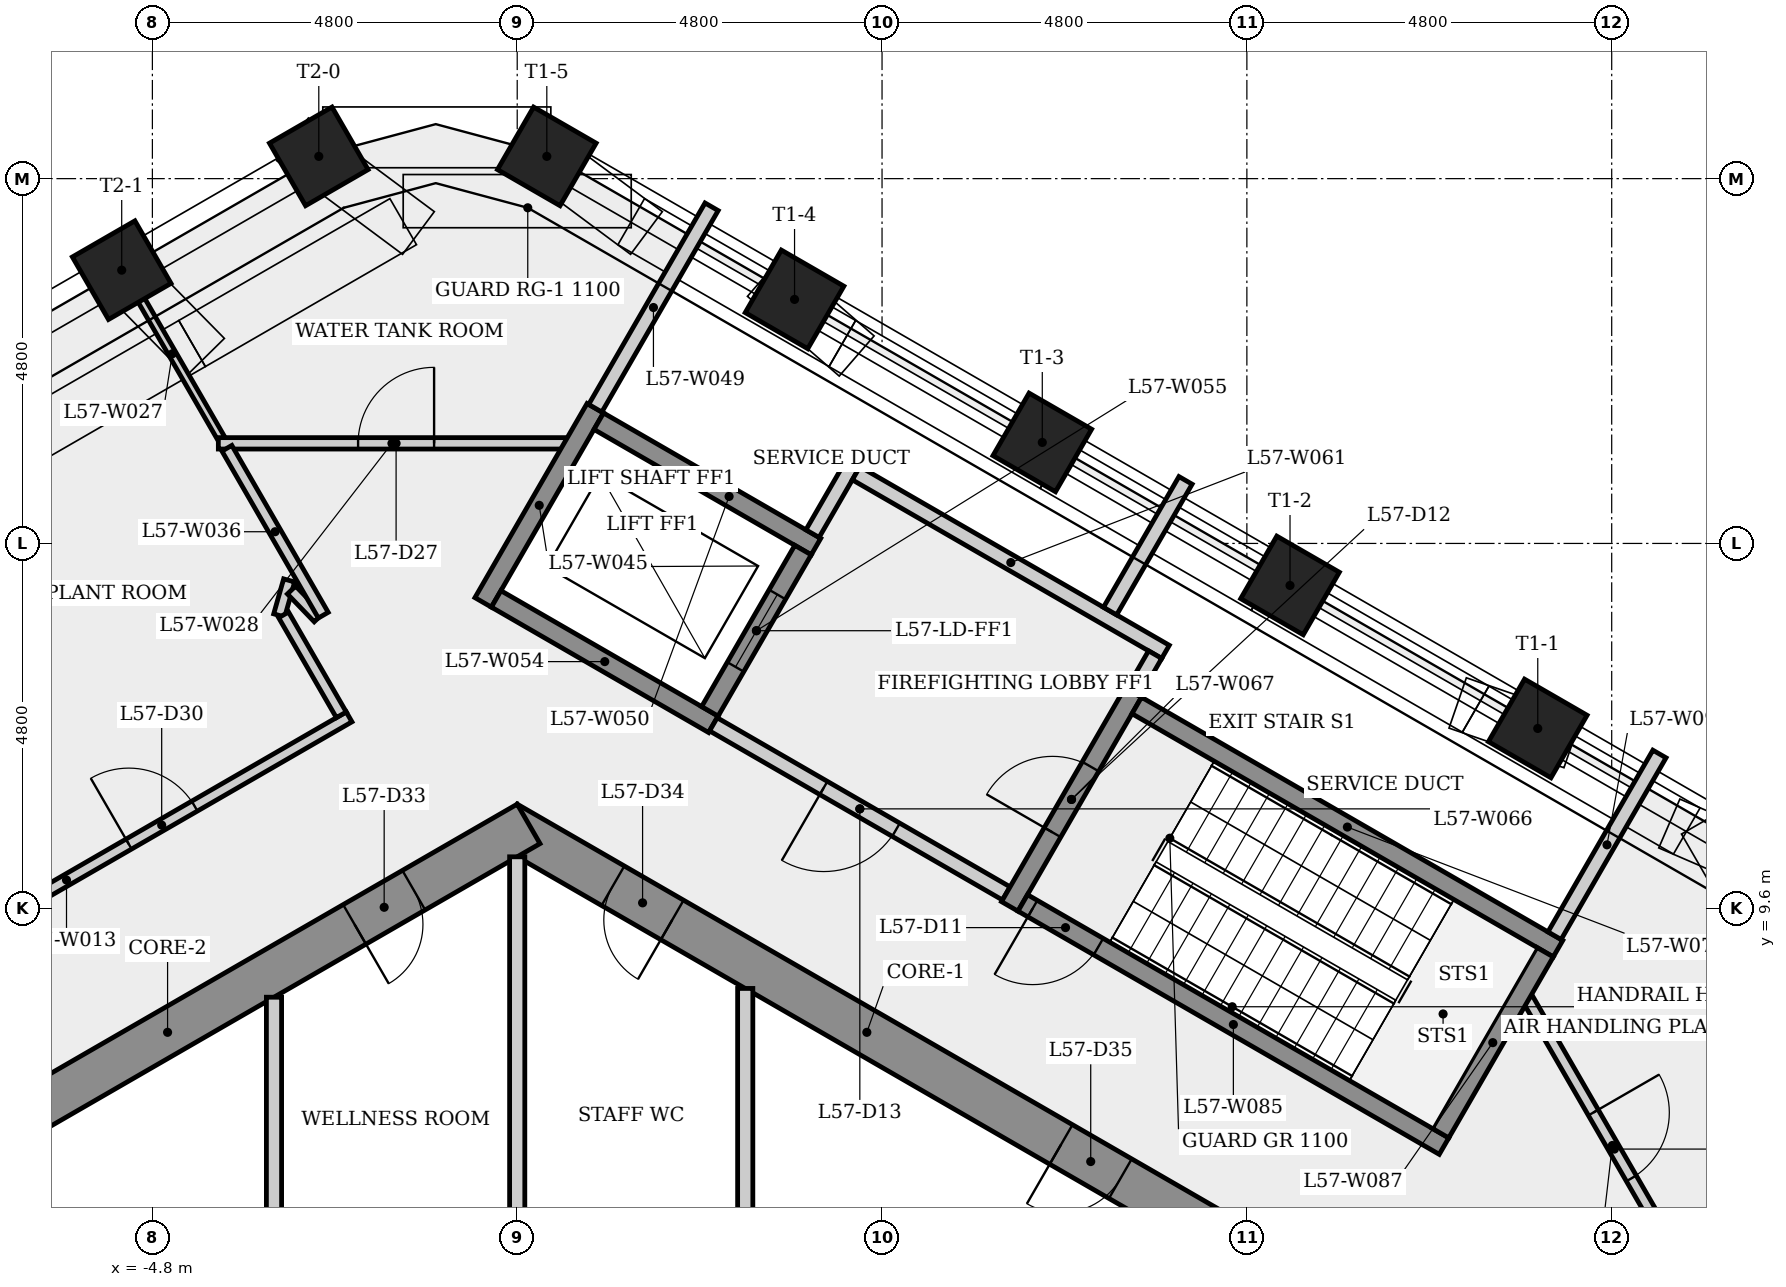
"""IFC4 building model, lengths in metres.
Left out: names, types, materials, properties, quantities, classifications, styles, units other than length and angle.
Written with IfcOpenShell. Run it as: python <this file> out.ifc"""

import sys

from ifc_helpers import new_model, si_unit, direction, frame, frame_2d, origin, origin_2d, place, context, subcontext, project, spatial, rectangle, extrude, element, fill, save


model = new_model("IFC4")
c1 = context("Model", 3, precision=1e-05, world=origin(), true_north=direction((0.0, 1.0)))
c2 = subcontext(c1, "Body", "Model", "MODEL_VIEW")
j1 = project(units=[si_unit("LENGTHUNIT", "METRE"), si_unit("PLANEANGLEUNIT", "RADIAN")], contexts=[c1])
p1 = place(None, origin())
s1 = spatial("IfcSite", under=j1, at=p1, CompositionType="ELEMENT")
p2 = place(p1, origin())
s2 = spatial("IfcBuilding", under=s1, at=p2, CompositionType="ELEMENT")
p3 = place(p2, frame((0.0, 0.0, 214.1)))
s3 = spatial("IfcBuildingStorey", under=s2, at=p3, CompositionType="ELEMENT", Elevation=214.1)
p4 = place(p3, frame((9.35, 5.225, 0.0), z_axis=(0.0, 0.0, 1.0), x_axis=(-0.866023993627, 0.500002442456, 0.0)))
e1 = element("IfcWall", 1, at=p4, inside=s3, PredefinedType="SHEAR", context=c2, shape_type="SweptSolid", body=[
    extrude(rectangle(XDim=10.97, YDim=0.6, at=frame_2d((5.485, 0.0))), origin(), (0.0, 0.0, 1.0), 4.8),
])
p5 = place(p4, frame((8.442, 0.0, 0.0)))
e2 = element("IfcOpeningElement", 2, at=p5, cuts=e1, PredefinedType="OPENING", context=c2, shape_type="SweptSolid", body=[
    extrude(rectangle(XDim=0.9, YDim=2.1, at=frame_2d((0.45, 1.05))), frame((0.0, 0.31, 0.0), z_axis=(0.0, -1.0, 0.0), x_axis=(1.0, 0.0, 0.0)), (0.0, 0.0, 1.0), 0.62),
])
p6 = place(p4, frame((1.634, 0.0, 0.0)))
e3 = element("IfcOpeningElement", 3, at=p6, cuts=e1, PredefinedType="OPENING", context=c2, shape_type="SweptSolid", body=[
    extrude(rectangle(XDim=0.9, YDim=2.1, at=frame_2d((0.45, 1.05))), frame((0.0, 0.31, 0.0), z_axis=(0.0, -1.0, 0.0), x_axis=(1.0, 0.0, 0.0)), (0.0, 0.0, 1.0), 0.62),
])
p7 = place(p3, frame((0.15, 10.71, 0.0), z_axis=(0.0, 0.0, 1.0), x_axis=(-0.866023993627, -0.500002442456, 0.0)))
e4 = element("IfcWall", 4, at=p7, inside=s3, PredefinedType="SHEAR", context=c2, shape_type="SweptSolid", body=[
    extrude(rectangle(XDim=10.97, YDim=0.6, at=frame_2d((5.485, 0.0))), origin(), (0.0, 0.0, 1.0), 4.8),
])
p8 = place(p7, frame((9.201, 0.0, 0.0)))
e5 = element("IfcOpeningElement", 5, at=p8, cuts=e4, PredefinedType="OPENING", context=c2, shape_type="SweptSolid", body=[
    extrude(rectangle(XDim=0.9, YDim=2.1, at=frame_2d((0.45, 1.05))), frame((0.0, 0.31, 0.0), z_axis=(0.0, -1.0, 0.0), x_axis=(1.0, 0.0, 0.0)), (0.0, 0.0, 1.0), 0.62),
])
p9 = place(p7, frame((1.744, 0.0, 0.0)))
e6 = element("IfcOpeningElement", 6, at=p9, cuts=e4, PredefinedType="OPENING", context=c2, shape_type="SweptSolid", body=[
    extrude(rectangle(XDim=0.9, YDim=2.1, at=frame_2d((0.45, 1.05))), frame((0.0, 0.31, 0.0), z_axis=(0.0, -1.0, 0.0), x_axis=(1.0, 0.0, 0.0)), (0.0, 0.0, 1.0), 0.62),
])
for number, where, z_axis, x_axis in (
    (7, (13.427, 11.966, 0.0), (0.0, 0.0, 1.0), (0.5, 0.866, 0.0)),
    (8, (10.168, 13.847, 0.0), (0.0, 0.0, 1.0), (0.5, 0.866, 0.0)),
    (9, (6.908, 15.729, 0.0), (0.0, 0.0, 1.0), (0.5, 0.866, 0.0)),
    (10, (3.649, 17.611, 0.0), (0.0, 0.0, 1.0), (0.5, 0.866, 0.0)),
    (11, (0.389, 19.493, 0.0), (0.0, 0.0, 1.0), (0.5, 0.866, 0.0)),
    (12, (-2.611, 19.493, 0.0), (0.0, 0.0, 1.0), (-0.5, 0.866, 0.0)),
    (13, (-5.204, 17.996, 0.0), (0.0, 0.0, 1.0), (-0.5, 0.866, 0.0)),
):
    element("IfcColumn", number, at=place(p3, frame(where, z_axis=z_axis, x_axis=x_axis)), inside=s3, PredefinedType="COLUMN", context=c2, shape_type="SweptSolid", body=[
        extrude(rectangle(XDim=0.95, YDim=0.95, at=origin_2d()), origin(), (0.0, 0.0, 1.0), 4.45),
    ])
p10 = place(p3, frame((-9.648, 7.824, 0.0), z_axis=(0.0, 0.0, 1.0), x_axis=(0.866024597333, 0.500001396812, 0.0)))
e14 = element("IfcWall", 14, at=p10, inside=s3, PredefinedType="PARTITIONING", context=c2, shape_type="SweptSolid", body=[
    extrude(rectangle(XDim=8.586, YDim=0.15, at=frame_2d((4.293, 0.0))), origin(), (0.0, 0.0, 1.0), 4.45),
])
p11 = place(p10, frame((5.239, 0.0, 0.0)))
e15 = element("IfcOpeningElement", 15, at=p11, cuts=e14, PredefinedType="OPENING", context=c2, shape_type="SweptSolid", body=[
    extrude(rectangle(XDim=1.0, YDim=2.1, at=frame_2d((0.5, 1.05))), frame((0.0, 0.085, 0.0), z_axis=(0.0, -1.0, 0.0), x_axis=(1.0, 0.0, 0.0)), (0.0, 0.0, 1.0), 0.17),
])
p12 = place(p3, frame((-3.895, 15.782, 0.0), z_axis=(0.0, 0.0, 1.0), x_axis=(-0.50002925274, 0.866008514048, 0.0)))
e16 = element("IfcWall", 16, at=p12, inside=s3, PredefinedType="PARTITIONING", context=c2, shape_type="SweptSolid", body=[
    extrude(rectangle(XDim=2.572, YDim=0.1, at=frame_2d((1.286, 0.0))), origin(), (0.0, 0.0, 1.0), 2.825),
])
p13 = place(p3, frame((-3.932, 15.717, 0.0), z_axis=(0.0, 0.0, 1.0), x_axis=(1.0, 0.0, 0.0)))
e17 = element("IfcWall", 17, at=p13, inside=s3, PredefinedType="PARTITIONING", context=c2, shape_type="SweptSolid", body=[
    extrude(rectangle(XDim=4.568, YDim=0.15, at=frame_2d((2.284, 0.0))), origin(), (0.0, 0.0, 1.0), 4.45),
])
p14 = place(p13, frame((1.839, 0.0, 0.0)))
e18 = element("IfcOpeningElement", 18, at=p14, cuts=e17, PredefinedType="OPENING", context=c2, shape_type="SweptSolid", body=[
    extrude(rectangle(XDim=1.0, YDim=2.1, at=frame_2d((0.5, 1.05))), frame((0.0, 0.085, 0.0), z_axis=(0.0, -1.0, 0.0), x_axis=(1.0, 0.0, 0.0)), (0.0, 0.0, 1.0), 0.17),
])
p15 = place(p3, frame((-3.2, 8.429, 0.0), z_axis=(0.0, 0.0, 1.0), x_axis=(0.0, -1.0, 0.0)))
e19 = element("IfcWall", 19, at=p15, inside=s3, PredefinedType="PARTITIONING", context=c2, shape_type="SweptSolid", body=[
    extrude(rectangle(XDim=3.154, YDim=0.2, at=frame_2d((1.577, 0.0))), origin(), (0.0, 0.0, 1.0), 4.45),
])
p16 = place(p3, frame((-3.132, 13.453, 0.0), z_axis=(0.0, 0.0, 1.0), x_axis=(0.273373621289, 0.961907928641, 0.0)))
e20 = element("IfcWall", 20, at=p16, inside=s3, PredefinedType="PARTITIONING", context=c2, shape_type="SweptSolid", body=[
    extrude(rectangle(XDim=0.479, YDim=0.15, at=frame_2d((0.239, 0.0))), origin(), (0.0, 0.0, 1.0), 4.45),
])
p17 = place(p3, frame((-2.969, 13.787, 0.0), z_axis=(0.0, 0.0, 1.0), x_axis=(0.694020012532, -0.719955708502, 0.0)))
e21 = element("IfcWall", 21, at=p17, inside=s3, PredefinedType="PARTITIONING", context=c2, shape_type="SweptSolid", body=[
    extrude(rectangle(XDim=0.508, YDim=0.15, at=frame_2d((0.254, 0.0))), origin(), (0.0, 0.0, 1.0), 4.45),
])
p18 = place(p3, frame((-2.552, 13.456, 0.0), z_axis=(0.0, 0.0, 1.0), x_axis=(-0.500011333847, 0.866018860086, 0.0)))
e22 = element("IfcWall", 22, at=p18, inside=s3, PredefinedType="PARTITIONING", context=c2, shape_type="SweptSolid", body=[
    extrude(rectangle(XDim=2.536, YDim=0.15, at=frame_2d((1.268, 0.0))), origin(), (0.0, 0.0, 1.0), 4.45),
])
p19 = place(p3, frame((-2.314, 12.145, 0.0), z_axis=(0.0, 0.0, 1.0), x_axis=(-0.499977585228, 0.866038344573, 0.0)))
e23 = element("IfcWall", 23, at=p19, inside=s3, PredefinedType="PARTITIONING", context=c2, shape_type="SweptSolid", body=[
    extrude(rectangle(XDim=1.519, YDim=0.15, at=frame_2d((0.759, 0.0))), origin(), (0.0, 0.0, 1.0), 4.45),
])
p20 = place(p3, frame((-0.448, 13.624, 0.0), z_axis=(0.0, 0.0, 1.0), x_axis=(0.500037662692, 0.866003658127, 0.0)))
e24 = element("IfcWall", 24, at=p20, inside=s3, PredefinedType="SHEAR", context=c2, shape_type="SweptSolid", body=[
    extrude(rectangle(XDim=2.95, YDim=0.25, at=frame_2d((1.475, 0.0))), origin(), (0.0, 0.0, 1.0), 4.45),
])
p21 = place(p3, frame((0.0, 10.277, 0.0), z_axis=(0.0, 0.0, 1.0), x_axis=(0.0, -1.0, 0.0)))
e25 = element("IfcWall", 25, at=p21, inside=s3, PredefinedType="PARTITIONING", context=c2, shape_type="SweptSolid", body=[
    extrude(rectangle(XDim=5.002, YDim=0.2, at=frame_2d((2.501, 0.0))), origin(), (0.0, 0.0, 1.0), 4.45),
])
p22 = place(p3, frame((1.027, 16.179, 0.0), z_axis=(0.0, 0.0, 1.0), x_axis=(0.500042361864, 0.866000944769, 0.0)))
e26 = element("IfcWall", 26, at=p22, inside=s3, PredefinedType="PLUMBINGWALL", context=c2, shape_type="SweptSolid", body=[
    extrude(rectangle(XDim=3.061, YDim=0.2, at=frame_2d((1.53, 0.0))), origin(), (0.0, 0.0, 1.0), 4.45),
])
for number, where, z_axis, x_axis in (
    (27, (1.073, 16.008, 0.0), (0.0, 0.0, 1.0), (0.866, -0.5, 0.0)),
    (28, (2.581, 12.02, 0.0), (0.0, 0.0, 1.0), (-0.866, 0.5, 0.0)),
):
    element("IfcWall", number, at=place(p3, frame(where, z_axis=z_axis, x_axis=x_axis)), inside=s3, PredefinedType="SHEAR", context=c2, shape_type="SweptSolid", body=[
        extrude(rectangle(XDim=3.3, YDim=0.25, at=frame_2d((1.65, 0.0))), origin(), (0.0, 0.0, 1.0), 4.45),
    ])
p23 = place(p3, frame((2.535, 12.191, 0.0), z_axis=(0.0, 0.0, 1.0), x_axis=(0.500061746146, 0.865989751695, 0.0)))
e29 = element("IfcWall", 29, at=p23, inside=s3, PredefinedType="SHEAR", context=c2, shape_type="SweptSolid", body=[
    extrude(rectangle(XDim=2.45, YDim=0.25, at=frame_2d((1.225, 0.0))), origin(), (0.0, 0.0, 1.0), 4.8),
])
p24 = place(p23, frame((0.675, 0.0, 0.0)))
e30 = element("IfcOpeningElement", 30, at=p24, cuts=e29, PredefinedType="OPENING", context=c2, shape_type="SweptSolid", body=[
    extrude(rectangle(XDim=1.1, YDim=2.1, at=frame_2d((0.55, 1.05))), frame((0.0, 0.135, 0.0), z_axis=(0.0, -1.0, 0.0), x_axis=(1.0, 0.0, 0.0)), (0.0, 0.0, 1.0), 0.27),
])
p25 = place(p3, frame((3.0, 8.545, 0.0), z_axis=(0.0, 0.0, 1.0), x_axis=(0.0, -1.0, 0.0)))
e31 = element("IfcWall", 31, at=p25, inside=s3, PredefinedType="PARTITIONING", context=c2, shape_type="SweptSolid", body=[
    extrude(rectangle(XDim=3.27, YDim=0.2, at=frame_2d((1.635, 0.0))), origin(), (0.0, 0.0, 1.0), 4.45),
])
p26 = place(p3, frame((3.885, 14.529, 0.0), z_axis=(0.0, 0.0, 1.0), x_axis=(0.499997628298, 0.866026773083, 0.0)))
e32 = element("IfcWall", 32, at=p26, inside=s3, PredefinedType="PLUMBINGWALL", context=c2, shape_type="SweptSolid", body=[
    extrude(rectangle(XDim=1.075, YDim=0.2, at=frame_2d((0.538, 0.0))), origin(), (0.0, 0.0, 1.0), 4.45),
])
p27 = place(p3, frame((4.459, 15.323, 0.0), z_axis=(0.0, 0.0, 1.0), x_axis=(0.866016039709, -0.500016218704, 0.0)))
e33 = element("IfcWall", 33, at=p27, inside=s3, PredefinedType="PLUMBINGWALL", context=c2, shape_type="SweptSolid", body=[
    extrude(rectangle(XDim=4.7, YDim=0.2, at=frame_2d((2.35, 0.0))), origin(), (0.0, 0.0, 1.0), 4.45),
])
p28 = place(p3, frame((6.435, 9.795, 0.0), z_axis=(0.0, 0.0, 1.0), x_axis=(-0.866012907634, 0.500021643343, 0.0)))
e34 = element("IfcWall", 34, at=p28, inside=s3, PredefinedType="PARTITIONING", context=c2, shape_type="SweptSolid", body=[
    extrude(rectangle(XDim=4.45, YDim=0.2, at=frame_2d((2.225, 0.0))), origin(), (0.0, 0.0, 1.0), 4.45),
])
p29 = place(p28, frame((1.675, 0.0, 0.0)))
e35 = element("IfcOpeningElement", 35, at=p29, cuts=e34, PredefinedType="OPENING", context=c2, shape_type="SweptSolid", body=[
    extrude(rectangle(XDim=1.1, YDim=2.1, at=frame_2d((0.55, 1.05))), frame((0.0, 0.11, 0.0), z_axis=(0.0, -1.0, 0.0), x_axis=(1.0, 0.0, 0.0)), (0.0, 0.0, 1.0), 0.22),
])
p30 = place(p3, frame((6.48, 9.624, 0.0), z_axis=(0.0, 0.0, 1.0), x_axis=(0.500017246033, 0.866015446554, 0.0)))
e36 = element("IfcWall", 36, at=p30, inside=s3, PredefinedType="SHEAR", context=c2, shape_type="SweptSolid", body=[
    extrude(rectangle(XDim=3.25, YDim=0.25, at=frame_2d((1.625, 0.0))), origin(), (0.0, 0.0, 1.0), 4.45),
])
p31 = place(p30, frame((1.125, 0.0, 0.0)))
e37 = element("IfcOpeningElement", 37, at=p31, cuts=e36, PredefinedType="OPENING", context=c2, shape_type="SweptSolid", body=[
    extrude(rectangle(XDim=1.0, YDim=2.1, at=frame_2d((0.5, 1.05))), frame((0.0, 0.135, 0.0), z_axis=(0.0, -1.0, 0.0), x_axis=(1.0, 0.0, 0.0)), (0.0, 0.0, 1.0), 0.27),
])
p32 = place(p3, frame((7.8, 13.51, 0.0), z_axis=(0.0, 0.0, 1.0), x_axis=(0.500013342794, 0.866017700182, 0.0)))
e38 = element("IfcWall", 38, at=p32, inside=s3, PredefinedType="PLUMBINGWALL", context=c2, shape_type="SweptSolid", body=[
    extrude(rectangle(XDim=1.986, YDim=0.2, at=frame_2d((0.993, 0.0))), origin(), (0.0, 0.0, 1.0), 4.45),
])
p33 = place(p3, frame((8.151, 12.268, 0.0), z_axis=(0.0, 0.0, 1.0), x_axis=(0.866025499775, -0.499999833739, 0.0)))
e39 = element("IfcWall", 39, at=p33, inside=s3, PredefinedType="SHEAR", context=c2, shape_type="SweptSolid", body=[
    extrude(rectangle(XDim=6.4, YDim=0.25, at=frame_2d((3.2, 0.0))), origin(), (0.0, 0.0, 1.0), 4.45),
])
p34 = place(p3, frame((8.393, 12.937, 0.0), z_axis=(0.0, 0.0, 1.0), x_axis=(-0.500065409566, -0.86598763626, 0.0)))
e40 = element("IfcWall", 40, at=p34, inside=s3, PredefinedType="PLUMBINGWALL", context=c2, shape_type="SweptSolid", body=[
    extrude(rectangle(XDim=0.575, YDim=0.2, at=frame_2d((0.288, 0.0))), origin(), (0.0, 0.0, 1.0), 4.45),
])
p35 = place(p3, frame((12.194, 6.47, 0.0), z_axis=(0.0, 0.0, 1.0), x_axis=(-0.866025499775, 0.499999833739, 0.0)))
e41 = element("IfcWall", 41, at=p35, inside=s3, PredefinedType="SHEAR", context=c2, shape_type="SweptSolid", body=[
    extrude(rectangle(XDim=6.4, YDim=0.25, at=frame_2d((3.2, 0.0))), origin(), (0.0, 0.0, 1.0), 4.45),
])
p36 = place(p35, frame((5.25, 0.0, 0.0)))
e42 = element("IfcOpeningElement", 42, at=p36, cuts=e41, PredefinedType="OPENING", context=c2, shape_type="SweptSolid", body=[
    extrude(rectangle(XDim=1.0, YDim=2.1, at=frame_2d((0.5, 1.05))), frame((0.0, 0.135, 0.0), z_axis=(0.0, -1.0, 0.0), x_axis=(1.0, 0.0, 0.0)), (0.0, 0.0, 1.0), 0.27),
])
p37 = place(p3, frame((13.294, 8.409, 0.0), z_axis=(0.0, 0.0, 1.0), x_axis=(0.499990817114, -0.866030705461, 0.0)))
e43 = element("IfcWall", 43, at=p37, inside=s3, PredefinedType="PARTITIONING", context=c2, shape_type="SweptSolid", body=[
    extrude(rectangle(XDim=4.567, YDim=0.15, at=frame_2d((2.284, 0.0))), origin(), (0.0, 0.0, 1.0), 4.45),
])
p38 = place(p37, frame((1.729, 0.0, 0.0)))
e44 = element("IfcOpeningElement", 44, at=p38, cuts=e43, PredefinedType="OPENING", context=c2, shape_type="SweptSolid", body=[
    extrude(rectangle(XDim=1.0, YDim=2.1, at=frame_2d((0.5, 1.05))), frame((0.0, 0.085, 0.0), z_axis=(0.0, -1.0, 0.0), x_axis=(1.0, 0.0, 0.0)), (0.0, 0.0, 1.0), 0.17),
])
p39 = place(p3, frame((12.148, 6.641, 0.0), z_axis=(0.0, 0.0, 1.0), x_axis=(0.500034990121, 0.866005201286, 0.0)))
e45 = element("IfcWall", 45, at=p39, inside=s3, PredefinedType="SHEAR", context=c2, shape_type="SweptSolid", body=[
    extrude(rectangle(XDim=2.75, YDim=0.25, at=frame_2d((1.375, 0.0))), origin(), (0.0, 0.0, 1.0), 4.45),
])
p40 = place(p3, frame((15.028, 11.63, 0.0), z_axis=(0.0, 0.0, 1.0), x_axis=(-0.500000584575, -0.86602506628, 0.0)))
e46 = element("IfcWall", 46, at=p40, inside=s3, PredefinedType="PLUMBINGWALL", context=c2, shape_type="SweptSolid", body=[
    extrude(rectangle(XDim=2.761, YDim=0.2, at=frame_2d((1.38, 0.0))), origin(), (0.0, 0.0, 1.0), 4.45),
])
p41 = place(p36, origin())
e47 = element("IfcDoor", 47, at=p41, inside=s3, OperationType="SINGLE_SWING_RIGHT", PredefinedType="DOOR", context=c2, shape_type="SweptSolid", body=[
    extrude(rectangle(XDim=1.0, YDim=2.1, at=frame_2d((0.5, 1.05))), frame((0.0, 0.025, 0.0), z_axis=(0.0, -1.0, 0.0), x_axis=(1.0, 0.0, 0.0)), (0.0, 0.0, 1.0), 0.05),
])
fill(e42, e47)
p42 = place(p31, origin())
e48 = element("IfcDoor", 48, at=p42, inside=s3, OperationType="SINGLE_SWING_LEFT", PredefinedType="DOOR", context=c2, shape_type="SweptSolid", body=[
    extrude(rectangle(XDim=1.0, YDim=2.1, at=frame_2d((0.5, 1.05))), frame((0.0, 0.025, 0.0), z_axis=(0.0, -1.0, 0.0), x_axis=(1.0, 0.0, 0.0)), (0.0, 0.0, 1.0), 0.05),
])
fill(e37, e48)
p43 = place(p29, origin())
e49 = element("IfcDoor", 49, at=p43, inside=s3, OperationType="SINGLE_SWING_RIGHT", PredefinedType="DOOR", context=c2, shape_type="SweptSolid", body=[
    extrude(rectangle(XDim=1.1, YDim=2.1, at=frame_2d((0.55, 1.05))), frame((0.0, 0.025, 0.0), z_axis=(0.0, -1.0, 0.0), x_axis=(1.0, 0.0, 0.0)), (0.0, 0.0, 1.0), 0.05),
])
fill(e35, e49)
p44 = place(p24, origin())
e50 = element("IfcDoor", 50, at=p44, inside=s3, OperationType="SLIDING_TO_LEFT", PredefinedType="DOOR", context=c2, shape_type="SweptSolid", body=[
    extrude(rectangle(XDim=1.1, YDim=2.1, at=frame_2d((0.55, 1.05))), frame((0.0, 0.025, 0.0), z_axis=(0.0, -1.0, 0.0), x_axis=(1.0, 0.0, 0.0)), (0.0, 0.0, 1.0), 0.05),
])
fill(e30, e50)
p45 = place(p38, origin())
e51 = element("IfcDoor", 51, at=p45, inside=s3, OperationType="SINGLE_SWING_LEFT", PredefinedType="DOOR", context=c2, shape_type="SweptSolid", body=[
    extrude(rectangle(XDim=1.0, YDim=2.1, at=frame_2d((0.5, 1.05))), frame((0.0, 0.025, 0.0), z_axis=(0.0, -1.0, 0.0), x_axis=(1.0, 0.0, 0.0)), (0.0, 0.0, 1.0), 0.05),
])
fill(e44, e51)
p46 = place(p14, origin())
e52 = element("IfcDoor", 52, at=p46, inside=s3, OperationType="SINGLE_SWING_RIGHT", PredefinedType="DOOR", context=c2, shape_type="SweptSolid", body=[
    extrude(rectangle(XDim=1.0, YDim=2.1, at=frame_2d((0.5, 1.05))), frame((0.0, 0.025, 0.0), z_axis=(0.0, -1.0, 0.0), x_axis=(1.0, 0.0, 0.0)), (0.0, 0.0, 1.0), 0.05),
])
fill(e18, e52)
p47 = place(p11, origin())
e53 = element("IfcDoor", 53, at=p47, inside=s3, OperationType="SINGLE_SWING_LEFT", PredefinedType="DOOR", context=c2, shape_type="SweptSolid", body=[
    extrude(rectangle(XDim=1.0, YDim=2.1, at=frame_2d((0.5, 1.05))), frame((0.0, 0.025, 0.0), z_axis=(0.0, -1.0, 0.0), x_axis=(1.0, 0.0, 0.0)), (0.0, 0.0, 1.0), 0.05),
])
fill(e15, e53)
p48 = place(p9, origin())
e54 = element("IfcDoor", 54, at=p48, inside=s3, OperationType="SINGLE_SWING_RIGHT", PredefinedType="DOOR", context=c2, shape_type="SweptSolid", body=[
    extrude(rectangle(XDim=0.9, YDim=2.1, at=frame_2d((0.45, 1.05))), frame((0.0, 0.025, 0.0), z_axis=(0.0, -1.0, 0.0), x_axis=(1.0, 0.0, 0.0)), (0.0, 0.0, 1.0), 0.05),
])
fill(e6, e54)
p49 = place(p5, origin())
e55 = element("IfcDoor", 55, at=p49, inside=s3, OperationType="SINGLE_SWING_LEFT", PredefinedType="DOOR", context=c2, shape_type="SweptSolid", body=[
    extrude(rectangle(XDim=0.9, YDim=2.1, at=frame_2d((0.45, 1.05))), frame((0.0, 0.025, 0.0), z_axis=(0.0, -1.0, 0.0), x_axis=(1.0, 0.0, 0.0)), (0.0, 0.0, 1.0), 0.05),
])
fill(e2, e55)
p50 = place(p6, origin())
e56 = element("IfcDoor", 56, at=p50, inside=s3, OperationType="SINGLE_SWING_RIGHT", PredefinedType="DOOR", context=c2, shape_type="SweptSolid", body=[
    extrude(rectangle(XDim=0.9, YDim=2.1, at=frame_2d((0.45, 1.05))), frame((0.0, 0.025, 0.0), z_axis=(0.0, -1.0, 0.0), x_axis=(1.0, 0.0, 0.0)), (0.0, 0.0, 1.0), 0.05),
])
fill(e3, e56)
save(model, sys.argv[1])
